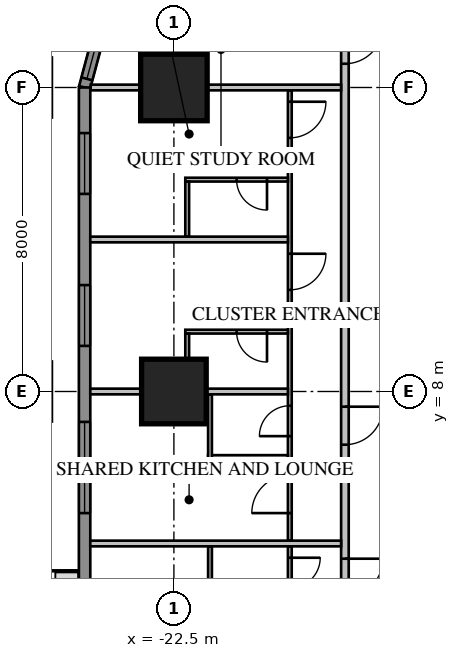
"""IFC4 building model, lengths in metres.
Left out: names, types, materials, properties, quantities, classifications, styles, units other than length and angle.
Written with IfcOpenShell. Run it as: python <this file> out.ifc"""

import sys

from ifc_helpers import new_model, si_unit, direction, frame, frame_2d, origin, origin_2d, place, context, subcontext, project, spatial, rectangle, extrude, element, fill, save


model = new_model("IFC4")
c1 = context("Model", 3, precision=1e-05, world=origin(), true_north=direction((0.0, 1.0)))
c2 = subcontext(c1, "Body", "Model", "MODEL_VIEW")
j1 = project(units=[si_unit("LENGTHUNIT", "METRE"), si_unit("PLANEANGLEUNIT", "RADIAN")], contexts=[c1])
p1 = place(None, origin())
s1 = spatial("IfcSite", under=j1, at=p1, CompositionType="ELEMENT")
p2 = place(p1, origin())
s2 = spatial("IfcBuilding", under=s1, at=p2, CompositionType="ELEMENT")
p3 = place(p2, frame((0.0, 0.0, 19.85)))
s3 = spatial("IfcBuildingStorey", under=s2, at=p3, CompositionType="ELEMENT", Elevation=19.85)
p4 = place(p3, frame((-22.5, 16.0, 0.0), z_axis=(0.0, 0.0, 1.0), x_axis=(1.0, 0.0, 0.0)))
e1 = element("IfcColumn", 1, at=p4, inside=s3, PredefinedType="COLUMN", context=c2, shape_type="SweptSolid", body=[
    extrude(rectangle(XDim=1.75, YDim=1.75, at=origin_2d()), origin(), (0.0, 0.0, 1.0), 3.85),
])
p5 = place(p3, frame((-22.5, 8.0, 0.0), z_axis=(0.0, 0.0, 1.0), x_axis=(1.0, 0.0, 0.0)))
e2 = element("IfcColumn", 2, at=p5, inside=s3, PredefinedType="COLUMN", context=c2, shape_type="SweptSolid", body=[
    extrude(rectangle(XDim=1.7, YDim=1.7, at=origin_2d()), origin(), (0.0, 0.0, 1.0), 3.85),
])
p6 = place(p3, frame((-23.664, 20.425, 0.0), z_axis=(0.0, 0.0, 1.0), x_axis=(-0.258839972501, -0.965920218567, 0.0)))
e3 = element("IfcWall", 3, at=p6, inside=s3, PredefinedType="SOLIDWALL", context=c2, shape_type="SweptSolid", body=[
    extrude(rectangle(XDim=4.581, YDim=0.3, at=frame_2d((2.291, 0.0))), origin(), (0.0, 0.0, 1.0), 3.65),
])
p7 = place(p6, frame((2.746, 0.0, 0.75)))
e4 = element("IfcOpeningElement", 4, at=p7, cuts=e3, PredefinedType="OPENING", context=c2, shape_type="SweptSolid", body=[
    extrude(rectangle(XDim=1.6, YDim=1.8, at=frame_2d((0.8, 0.9))), frame((0.0, 0.17, 0.0), z_axis=(0.0, -1.0, 0.0), x_axis=(1.0, 0.0, 0.0)), (0.0, 0.0, 1.0), 0.34),
])
p8 = place(p3, frame((-24.85, 16.0, 0.0), z_axis=(0.0, 0.0, 1.0), x_axis=(0.0, -1.0, 0.0)))
e5 = element("IfcWall", 5, at=p8, inside=s3, PredefinedType="SOLIDWALL", context=c2, shape_type="SweptSolid", body=[
    extrude(rectangle(XDim=32.0, YDim=0.3, at=frame_2d((16.0, 0.0))), origin(), (0.0, 0.0, 1.0), 3.65),
])
p9 = place(p8, frame((1.2, 0.0, 0.75)))
e6 = element("IfcOpeningElement", 6, at=p9, cuts=e5, PredefinedType="OPENING", context=c2, shape_type="SweptSolid", body=[
    extrude(rectangle(XDim=1.6, YDim=1.8, at=frame_2d((0.8, 0.9))), frame((0.0, 0.17, 0.0), z_axis=(0.0, -1.0, 0.0), x_axis=(1.0, 0.0, 0.0)), (0.0, 0.0, 1.0), 0.34),
])
p10 = place(p8, frame((5.2, 0.0, 0.75)))
e7 = element("IfcOpeningElement", 7, at=p10, cuts=e5, PredefinedType="OPENING", context=c2, shape_type="SweptSolid", body=[
    extrude(rectangle(XDim=1.6, YDim=1.8, at=frame_2d((0.8, 0.9))), frame((0.0, 0.17, 0.0), z_axis=(0.0, -1.0, 0.0), x_axis=(1.0, 0.0, 0.0)), (0.0, 0.0, 1.0), 0.34),
])
p11 = place(p8, frame((17.2, 0.0, 0.75)))
e8 = element("IfcOpeningElement", 8, at=p11, cuts=e5, PredefinedType="OPENING", context=c2, shape_type="SweptSolid", body=[
    extrude(rectangle(XDim=1.6, YDim=1.8, at=frame_2d((0.8, 0.9))), frame((0.0, 0.17, 0.0), z_axis=(0.0, -1.0, 0.0), x_axis=(1.0, 0.0, 0.0)), (0.0, 0.0, 1.0), 0.34),
])
p12 = place(p8, frame((21.2, 0.0, 0.75)))
e9 = element("IfcOpeningElement", 9, at=p12, cuts=e5, PredefinedType="OPENING", context=c2, shape_type="SweptSolid", body=[
    extrude(rectangle(XDim=1.6, YDim=1.8, at=frame_2d((0.8, 0.9))), frame((0.0, 0.17, 0.0), z_axis=(0.0, -1.0, 0.0), x_axis=(1.0, 0.0, 0.0)), (0.0, 0.0, 1.0), 0.34),
])
p13 = place(p8, frame((25.2, 0.0, 0.75)))
e10 = element("IfcOpeningElement", 10, at=p13, cuts=e5, PredefinedType="OPENING", context=c2, shape_type="SweptSolid", body=[
    extrude(rectangle(XDim=1.6, YDim=1.8, at=frame_2d((0.8, 0.9))), frame((0.0, 0.17, 0.0), z_axis=(0.0, -1.0, 0.0), x_axis=(1.0, 0.0, 0.0)), (0.0, 0.0, 1.0), 0.34),
])
p14 = place(p8, frame((29.2, 0.0, 0.75)))
e11 = element("IfcOpeningElement", 11, at=p14, cuts=e5, PredefinedType="OPENING", context=c2, shape_type="SweptSolid", body=[
    extrude(rectangle(XDim=1.6, YDim=1.8, at=frame_2d((0.8, 0.9))), frame((0.0, 0.17, 0.0), z_axis=(0.0, -1.0, 0.0), x_axis=(1.0, 0.0, 0.0)), (0.0, 0.0, 1.0), 0.34),
])
p15 = place(p8, frame((8.8, 0.0, 0.75)))
e12 = element("IfcOpeningElement", 12, at=p15, cuts=e5, PredefinedType="OPENING", context=c2, shape_type="SweptSolid", body=[
    extrude(rectangle(XDim=2.4, YDim=1.8, at=frame_2d((1.2, 0.9))), frame((0.0, 0.17, 0.0), z_axis=(0.0, -1.0, 0.0), x_axis=(1.0, 0.0, 0.0)), (0.0, 0.0, 1.0), 0.34),
])
p16 = place(p8, frame((13.812, 0.0, 0.0)))
e13 = element("IfcOpeningElement", 13, at=p16, cuts=e5, PredefinedType="OPENING", context=c2, shape_type="SweptSolid", body=[
    extrude(rectangle(XDim=1.0, YDim=2.4, at=frame_2d((0.5, 1.2))), frame((0.0, 0.17, 0.0), z_axis=(0.0, -1.0, 0.0), x_axis=(1.0, 0.0, 0.0)), (0.0, 0.0, 1.0), 0.34),
])
p17 = place(p3, frame((-18.0, 18.0, 0.0), z_axis=(0.0, 0.0, 1.0), x_axis=(0.0, -1.0, 0.0)))
e14 = element("IfcWall", 14, at=p17, inside=s3, PredefinedType="PARTITIONING", context=c2, shape_type="SweptSolid", body=[
    extrude(rectangle(XDim=36.0, YDim=0.2, at=frame_2d((18.0, 0.0))), origin(), (0.0, 0.0, 1.0), 3.65),
])
p18 = place(p17, frame((10.4, 0.0, 0.0)))
e15 = element("IfcOpeningElement", 15, at=p18, cuts=e14, PredefinedType="OPENING", context=c2, shape_type="SweptSolid", body=[
    extrude(rectangle(XDim=1.0, YDim=2.1, at=frame_2d((0.5, 1.05))), frame((0.0, 0.12, 0.0), z_axis=(0.0, -1.0, 0.0), x_axis=(1.0, 0.0, 0.0)), (0.0, 0.0, 1.0), 0.24),
])
p19 = place(p17, frame((14.4, 0.0, 0.0)))
e16 = element("IfcOpeningElement", 16, at=p19, cuts=e14, PredefinedType="OPENING", context=c2, shape_type="SweptSolid", body=[
    extrude(rectangle(XDim=1.0, YDim=2.1, at=frame_2d((0.5, 1.05))), frame((0.0, 0.12, 0.0), z_axis=(0.0, -1.0, 0.0), x_axis=(1.0, 0.0, 0.0)), (0.0, 0.0, 1.0), 0.24),
])
p20 = place(p17, frame((0.375, 0.0, 0.0)))
e17 = element("IfcOpeningElement", 17, at=p20, cuts=e14, PredefinedType="OPENING", context=c2, shape_type="SweptSolid", body=[
    extrude(rectangle(XDim=1.0, YDim=2.1, at=frame_2d((0.5, 1.05))), frame((0.0, 0.12, 0.0), z_axis=(0.0, -1.0, 0.0), x_axis=(1.0, 0.0, 0.0)), (0.0, 0.0, 1.0), 0.24),
])
p21 = place(p17, frame((34.375, 0.0, 0.0)))
e18 = element("IfcOpeningElement", 18, at=p21, cuts=e14, PredefinedType="OPENING", context=c2, shape_type="SweptSolid", body=[
    extrude(rectangle(XDim=0.95, YDim=2.1, at=frame_2d((0.475, 1.05))), frame((0.0, 0.12, 0.0), z_axis=(0.0, -1.0, 0.0), x_axis=(1.0, 0.0, 0.0)), (0.0, 0.0, 1.0), 0.24),
])
p22 = place(p3, frame((-19.45, 15.925, 0.0), z_axis=(0.0, 0.0, 1.0), x_axis=(0.0, -1.0, 0.0)))
e19 = element("IfcWall", 19, at=p22, inside=s3, PredefinedType="PARTITIONING", context=c2, shape_type="SweptSolid", body=[
    extrude(rectangle(XDim=11.85, YDim=0.1, at=frame_2d((5.925, 0.0))), origin(), (0.0, 0.0, 1.0), 3.65),
])
p23 = place(p22, frame((10.125, 0.0, 0.0)))
e20 = element("IfcOpeningElement", 20, at=p23, cuts=e19, PredefinedType="OPENING", context=c2, shape_type="SweptSolid", body=[
    extrude(rectangle(XDim=1.0, YDim=2.1, at=frame_2d((0.5, 1.05))), frame((0.0, 0.07, 0.0), z_axis=(0.0, -1.0, 0.0), x_axis=(1.0, 0.0, 0.0)), (0.0, 0.0, 1.0), 0.14),
])
p24 = place(p22, frame((8.3, 0.0, 0.0)))
e21 = element("IfcOpeningElement", 21, at=p24, cuts=e19, PredefinedType="OPENING", context=c2, shape_type="SweptSolid", body=[
    extrude(rectangle(XDim=0.8, YDim=2.1, at=frame_2d((0.4, 1.05))), frame((0.0, 0.07, 0.0), z_axis=(0.0, -1.0, 0.0), x_axis=(1.0, 0.0, 0.0)), (0.0, 0.0, 1.0), 0.14),
])
p25 = place(p22, frame((0.3, 0.0, 0.0)))
e22 = element("IfcOpeningElement", 22, at=p25, cuts=e19, PredefinedType="OPENING", context=c2, shape_type="SweptSolid", body=[
    extrude(rectangle(XDim=0.95, YDim=2.1, at=frame_2d((0.475, 1.05))), frame((0.0, 0.07, 0.0), z_axis=(0.0, -1.0, 0.0), x_axis=(1.0, 0.0, 0.0)), (0.0, 0.0, 1.0), 0.14),
])
p26 = place(p22, frame((4.3, 0.0, 0.0)))
e23 = element("IfcOpeningElement", 23, at=p26, cuts=e19, PredefinedType="OPENING", context=c2, shape_type="SweptSolid", body=[
    extrude(rectangle(XDim=0.95, YDim=2.1, at=frame_2d((0.475, 1.05))), frame((0.0, 0.07, 0.0), z_axis=(0.0, -1.0, 0.0), x_axis=(1.0, 0.0, 0.0)), (0.0, 0.0, 1.0), 0.14),
])
p27 = place(p3, frame((-19.5, 6.275, 0.0), z_axis=(0.0, 0.0, 1.0), x_axis=(-1.0, 0.0, 0.0)))
e24 = element("IfcWall", 24, at=p27, inside=s3, PredefinedType="PARTITIONING", context=c2, shape_type="SweptSolid", body=[
    extrude(rectangle(XDim=2.1, YDim=0.1, at=frame_2d((1.05, 0.0))), origin(), (0.0, 0.0, 1.0), 3.65),
])
p28 = place(p3, frame((-21.55, 7.925, 0.0), z_axis=(0.0, 0.0, 1.0), x_axis=(0.0, -1.0, 0.0)))
e25 = element("IfcWall", 25, at=p28, inside=s3, PredefinedType="PARTITIONING", context=c2, shape_type="SweptSolid", body=[
    extrude(rectangle(XDim=1.7, YDim=0.1, at=frame_2d((0.85, 0.0))), origin(), (0.0, 0.0, 1.0), 3.65),
])
p29 = place(p3, frame((-19.45, 3.925, 0.0), z_axis=(0.0, 0.0, 1.0), x_axis=(0.0, -1.0, 0.0)))
e26 = element("IfcWall", 26, at=p29, inside=s3, PredefinedType="PARTITIONING", context=c2, shape_type="SweptSolid", body=[
    extrude(rectangle(XDim=19.85, YDim=0.1, at=frame_2d((9.925, 0.0))), origin(), (0.0, 0.0, 1.0), 3.65),
])
p30 = place(p29, frame((2.125, 0.0, 0.0)))
e27 = element("IfcOpeningElement", 27, at=p30, cuts=e26, PredefinedType="OPENING", context=c2, shape_type="SweptSolid", body=[
    extrude(rectangle(XDim=1.0, YDim=2.1, at=frame_2d((0.5, 1.05))), frame((0.0, 0.07, 0.0), z_axis=(0.0, -1.0, 0.0), x_axis=(1.0, 0.0, 0.0)), (0.0, 0.0, 1.0), 0.14),
])
p31 = place(p29, frame((0.3, 0.0, 0.0)))
e28 = element("IfcOpeningElement", 28, at=p31, cuts=e26, PredefinedType="OPENING", context=c2, shape_type="SweptSolid", body=[
    extrude(rectangle(XDim=0.8, YDim=2.1, at=frame_2d((0.4, 1.05))), frame((0.0, 0.07, 0.0), z_axis=(0.0, -1.0, 0.0), x_axis=(1.0, 0.0, 0.0)), (0.0, 0.0, 1.0), 0.14),
])
p32 = place(p29, frame((4.3, 0.0, 0.0)))
e29 = element("IfcOpeningElement", 29, at=p32, cuts=e26, PredefinedType="OPENING", context=c2, shape_type="SweptSolid", body=[
    extrude(rectangle(XDim=0.95, YDim=2.1, at=frame_2d((0.475, 1.05))), frame((0.0, 0.07, 0.0), z_axis=(0.0, -1.0, 0.0), x_axis=(1.0, 0.0, 0.0)), (0.0, 0.0, 1.0), 0.14),
])
p33 = place(p29, frame((8.3, 0.0, 0.0)))
e30 = element("IfcOpeningElement", 30, at=p33, cuts=e26, PredefinedType="OPENING", context=c2, shape_type="SweptSolid", body=[
    extrude(rectangle(XDim=0.95, YDim=2.1, at=frame_2d((0.475, 1.05))), frame((0.0, 0.07, 0.0), z_axis=(0.0, -1.0, 0.0), x_axis=(1.0, 0.0, 0.0)), (0.0, 0.0, 1.0), 0.14),
])
p34 = place(p29, frame((12.3, 0.0, 0.0)))
e31 = element("IfcOpeningElement", 31, at=p34, cuts=e26, PredefinedType="OPENING", context=c2, shape_type="SweptSolid", body=[
    extrude(rectangle(XDim=0.95, YDim=2.1, at=frame_2d((0.475, 1.05))), frame((0.0, 0.07, 0.0), z_axis=(0.0, -1.0, 0.0), x_axis=(1.0, 0.0, 0.0)), (0.0, 0.0, 1.0), 0.14),
])
p35 = place(p29, frame((16.3, 0.0, 0.0)))
e32 = element("IfcOpeningElement", 32, at=p35, cuts=e26, PredefinedType="OPENING", context=c2, shape_type="SweptSolid", body=[
    extrude(rectangle(XDim=0.95, YDim=2.1, at=frame_2d((0.475, 1.05))), frame((0.0, 0.07, 0.0), z_axis=(0.0, -1.0, 0.0), x_axis=(1.0, 0.0, 0.0)), (0.0, 0.0, 1.0), 0.14),
])
p36 = place(p3, frame((-21.55, 3.925, 0.0), z_axis=(0.0, 0.0, 1.0), x_axis=(0.0, -1.0, 0.0)))
e33 = element("IfcWall", 33, at=p36, inside=s3, PredefinedType="PARTITIONING", context=c2, shape_type="SweptSolid", body=[
    extrude(rectangle(XDim=1.7, YDim=0.1, at=frame_2d((0.85, 0.0))), origin(), (0.0, 0.0, 1.0), 3.65),
])
p37 = place(p3, frame((-18.1, 16.0, 0.0), z_axis=(0.0, 0.0, 1.0), x_axis=(-1.0, 0.0, 0.0)))
e34 = element("IfcWall", 34, at=p37, inside=s3, PredefinedType="PARTITIONING", context=c2, shape_type="SweptSolid", body=[
    extrude(rectangle(XDim=6.589, YDim=0.15, at=frame_2d((3.295, 0.0))), origin(), (0.0, 0.0, 1.0), 3.65),
])
for number, where, z_axis, x_axis in (
    (35, (-19.5, 12.0, 0.0), (0.0, 0.0, 1.0), (-1.0, 0.0, 0.0)),
    (36, (-19.5, 8.0, 0.0), (0.0, 0.0, 1.0), (-1.0, 0.0, 0.0)),
):
    element("IfcWall", number, at=place(p3, frame(where, z_axis=z_axis, x_axis=x_axis)), inside=s3, PredefinedType="PARTITIONING", context=c2, shape_type="SweptSolid", body=[
        extrude(rectangle(XDim=5.2, YDim=0.15, at=frame_2d((2.6, 0.0))), origin(), (0.0, 0.0, 1.0), 3.65),
    ])
p38 = place(p3, frame((-18.1, 4.0, 0.0), z_axis=(0.0, 0.0, 1.0), x_axis=(-1.0, 0.0, 0.0)))
e37 = element("IfcWall", 37, at=p38, inside=s3, PredefinedType="PARTITIONING", context=c2, shape_type="SweptSolid", body=[
    extrude(rectangle(XDim=6.6, YDim=0.15, at=frame_2d((3.3, 0.0))), origin(), (0.0, 0.0, 1.0), 3.65),
])
p39 = place(p3, frame((-19.5, 13.575, 0.0), z_axis=(0.0, 0.0, 1.0), x_axis=(-1.0, 0.0, 0.0)))
e38 = element("IfcWall", 38, at=p39, inside=s3, PredefinedType="PARTITIONING", context=c2, shape_type="SweptSolid", body=[
    extrude(rectangle(XDim=2.7, YDim=0.1, at=frame_2d((1.35, 0.0))), origin(), (0.0, 0.0, 1.0), 3.65),
])
p40 = place(p39, frame((0.55, 0.0, 0.0)))
e39 = element("IfcOpeningElement", 39, at=p40, cuts=e38, PredefinedType="OPENING", context=c2, shape_type="SweptSolid", body=[
    extrude(rectangle(XDim=0.8, YDim=2.1, at=frame_2d((0.4, 1.05))), frame((0.0, 0.07, 0.0), z_axis=(0.0, -1.0, 0.0), x_axis=(1.0, 0.0, 0.0)), (0.0, 0.0, 1.0), 0.14),
])
p41 = place(p3, frame((-22.15, 13.525, 0.0), z_axis=(0.0, 0.0, 1.0), x_axis=(0.0, -1.0, 0.0)))
e40 = element("IfcWall", 40, at=p41, inside=s3, PredefinedType="PARTITIONING", context=c2, shape_type="SweptSolid", body=[
    extrude(rectangle(XDim=1.45, YDim=0.1, at=frame_2d((0.725, 0.0))), origin(), (0.0, 0.0, 1.0), 3.65),
])
p42 = place(p3, frame((-19.5, 9.575, 0.0), z_axis=(0.0, 0.0, 1.0), x_axis=(-1.0, 0.0, 0.0)))
e41 = element("IfcWall", 41, at=p42, inside=s3, PredefinedType="PARTITIONING", context=c2, shape_type="SweptSolid", body=[
    extrude(rectangle(XDim=2.7, YDim=0.1, at=frame_2d((1.35, 0.0))), origin(), (0.0, 0.0, 1.0), 3.65),
])
p43 = place(p42, frame((0.55, 0.0, 0.0)))
e42 = element("IfcOpeningElement", 42, at=p43, cuts=e41, PredefinedType="OPENING", context=c2, shape_type="SweptSolid", body=[
    extrude(rectangle(XDim=0.8, YDim=2.1, at=frame_2d((0.4, 1.05))), frame((0.0, 0.07, 0.0), z_axis=(0.0, -1.0, 0.0), x_axis=(1.0, 0.0, 0.0)), (0.0, 0.0, 1.0), 0.14),
])
p44 = place(p3, frame((-22.15, 9.525, 0.0), z_axis=(0.0, 0.0, 1.0), x_axis=(0.0, -1.0, 0.0)))
e43 = element("IfcWall", 43, at=p44, inside=s3, PredefinedType="PARTITIONING", context=c2, shape_type="SweptSolid", body=[
    extrude(rectangle(XDim=1.45, YDim=0.1, at=frame_2d((0.725, 0.0))), origin(), (0.0, 0.0, 1.0), 3.65),
])
p45 = place(p7, origin())
e44 = element("IfcWindow", 44, at=p45, inside=s3, PartitioningType="SINGLE_PANEL", PredefinedType="WINDOW", context=c2, shape_type="SweptSolid", body=[
    extrude(rectangle(XDim=1.6, YDim=1.8, at=frame_2d((0.8, 0.9))), frame((0.0, 0.03, 0.0), z_axis=(0.0, -1.0, 0.0), x_axis=(1.0, 0.0, 0.0)), (0.0, 0.0, 1.0), 0.06),
])
fill(e4, e44)
p46 = place(p9, origin())
e45 = element("IfcWindow", 45, at=p46, inside=s3, PartitioningType="SINGLE_PANEL", PredefinedType="WINDOW", context=c2, shape_type="SweptSolid", body=[
    extrude(rectangle(XDim=1.6, YDim=1.8, at=frame_2d((0.8, 0.9))), frame((0.0, 0.03, 0.0), z_axis=(0.0, -1.0, 0.0), x_axis=(1.0, 0.0, 0.0)), (0.0, 0.0, 1.0), 0.06),
])
fill(e6, e45)
p47 = place(p10, origin())
e46 = element("IfcWindow", 46, at=p47, inside=s3, PartitioningType="SINGLE_PANEL", PredefinedType="WINDOW", context=c2, shape_type="SweptSolid", body=[
    extrude(rectangle(XDim=1.6, YDim=1.8, at=frame_2d((0.8, 0.9))), frame((0.0, 0.03, 0.0), z_axis=(0.0, -1.0, 0.0), x_axis=(1.0, 0.0, 0.0)), (0.0, 0.0, 1.0), 0.06),
])
fill(e7, e46)
p48 = place(p15, origin())
e47 = element("IfcWindow", 47, at=p48, inside=s3, PartitioningType="SINGLE_PANEL", PredefinedType="WINDOW", context=c2, shape_type="SweptSolid", body=[
    extrude(rectangle(XDim=2.4, YDim=1.8, at=frame_2d((1.2, 0.9))), frame((0.0, 0.03, 0.0), z_axis=(0.0, -1.0, 0.0), x_axis=(1.0, 0.0, 0.0)), (0.0, 0.0, 1.0), 0.06),
])
fill(e12, e47)
p49 = place(p18, origin())
e48 = element("IfcDoor", 48, at=p49, inside=s3, OperationType="SINGLE_SWING_LEFT", PredefinedType="DOOR", context=c2, shape_type="SweptSolid", body=[
    extrude(rectangle(XDim=1.0, YDim=2.1, at=frame_2d((0.5, 1.05))), frame((0.0, 0.025, 0.0), z_axis=(0.0, -1.0, 0.0), x_axis=(1.0, 0.0, 0.0)), (0.0, 0.0, 1.0), 0.05),
])
fill(e15, e48)
p50 = place(p23, origin())
e49 = element("IfcDoor", 49, at=p50, inside=s3, OperationType="SINGLE_SWING_RIGHT", PredefinedType="DOOR", context=c2, shape_type="SweptSolid", body=[
    extrude(rectangle(XDim=1.0, YDim=2.1, at=frame_2d((0.5, 1.05))), frame((0.0, 0.025, 0.0), z_axis=(0.0, -1.0, 0.0), x_axis=(1.0, 0.0, 0.0)), (0.0, 0.0, 1.0), 0.05),
])
fill(e20, e49)
p51 = place(p24, origin())
e50 = element("IfcDoor", 50, at=p51, inside=s3, OperationType="SINGLE_SWING_RIGHT", PredefinedType="DOOR", context=c2, shape_type="SweptSolid", body=[
    extrude(rectangle(XDim=0.8, YDim=2.1, at=frame_2d((0.4, 1.05))), frame((0.0, 0.025, 0.0), z_axis=(0.0, -1.0, 0.0), x_axis=(1.0, 0.0, 0.0)), (0.0, 0.0, 1.0), 0.05),
])
fill(e21, e50)
p52 = place(p19, origin())
e51 = element("IfcDoor", 51, at=p52, inside=s3, OperationType="SINGLE_SWING_LEFT", PredefinedType="DOOR", context=c2, shape_type="SweptSolid", body=[
    extrude(rectangle(XDim=1.0, YDim=2.1, at=frame_2d((0.5, 1.05))), frame((0.0, 0.025, 0.0), z_axis=(0.0, -1.0, 0.0), x_axis=(1.0, 0.0, 0.0)), (0.0, 0.0, 1.0), 0.05),
])
fill(e16, e51)
p53 = place(p31, origin())
e52 = element("IfcDoor", 52, at=p53, inside=s3, OperationType="SINGLE_SWING_LEFT", PredefinedType="DOOR", context=c2, shape_type="SweptSolid", body=[
    extrude(rectangle(XDim=0.8, YDim=2.1, at=frame_2d((0.4, 1.05))), frame((0.0, 0.025, 0.0), z_axis=(0.0, -1.0, 0.0), x_axis=(1.0, 0.0, 0.0)), (0.0, 0.0, 1.0), 0.05),
])
fill(e28, e52)
p54 = place(p20, origin())
e53 = element("IfcDoor", 53, at=p54, inside=s3, OperationType="SINGLE_SWING_LEFT", PredefinedType="DOOR", context=c2, shape_type="SweptSolid", body=[
    extrude(rectangle(XDim=1.0, YDim=2.1, at=frame_2d((0.5, 1.05))), frame((0.0, 0.025, 0.0), z_axis=(0.0, -1.0, 0.0), x_axis=(1.0, 0.0, 0.0)), (0.0, 0.0, 1.0), 0.05),
])
fill(e17, e53)
p55 = place(p25, origin())
e54 = element("IfcDoor", 54, at=p55, inside=s3, OperationType="SINGLE_SWING_LEFT", PredefinedType="DOOR", context=c2, shape_type="SweptSolid", body=[
    extrude(rectangle(XDim=0.95, YDim=2.1, at=frame_2d((0.475, 1.05))), frame((0.0, 0.025, 0.0), z_axis=(0.0, -1.0, 0.0), x_axis=(1.0, 0.0, 0.0)), (0.0, 0.0, 1.0), 0.05),
])
fill(e22, e54)
p56 = place(p40, origin())
e55 = element("IfcDoor", 55, at=p56, inside=s3, OperationType="SINGLE_SWING_LEFT", PredefinedType="DOOR", context=c2, shape_type="SweptSolid", body=[
    extrude(rectangle(XDim=0.8, YDim=2.1, at=frame_2d((0.4, 1.05))), frame((0.0, 0.025, 0.0), z_axis=(0.0, -1.0, 0.0), x_axis=(1.0, 0.0, 0.0)), (0.0, 0.0, 1.0), 0.05),
])
fill(e39, e55)
p57 = place(p26, origin())
e56 = element("IfcDoor", 56, at=p57, inside=s3, OperationType="SINGLE_SWING_LEFT", PredefinedType="DOOR", context=c2, shape_type="SweptSolid", body=[
    extrude(rectangle(XDim=0.95, YDim=2.1, at=frame_2d((0.475, 1.05))), frame((0.0, 0.025, 0.0), z_axis=(0.0, -1.0, 0.0), x_axis=(1.0, 0.0, 0.0)), (0.0, 0.0, 1.0), 0.05),
])
fill(e23, e56)
p58 = place(p43, origin())
e57 = element("IfcDoor", 57, at=p58, inside=s3, OperationType="SINGLE_SWING_LEFT", PredefinedType="DOOR", context=c2, shape_type="SweptSolid", body=[
    extrude(rectangle(XDim=0.8, YDim=2.1, at=frame_2d((0.4, 1.05))), frame((0.0, 0.025, 0.0), z_axis=(0.0, -1.0, 0.0), x_axis=(1.0, 0.0, 0.0)), (0.0, 0.0, 1.0), 0.05),
])
fill(e42, e57)
save(model, sys.argv[1])
